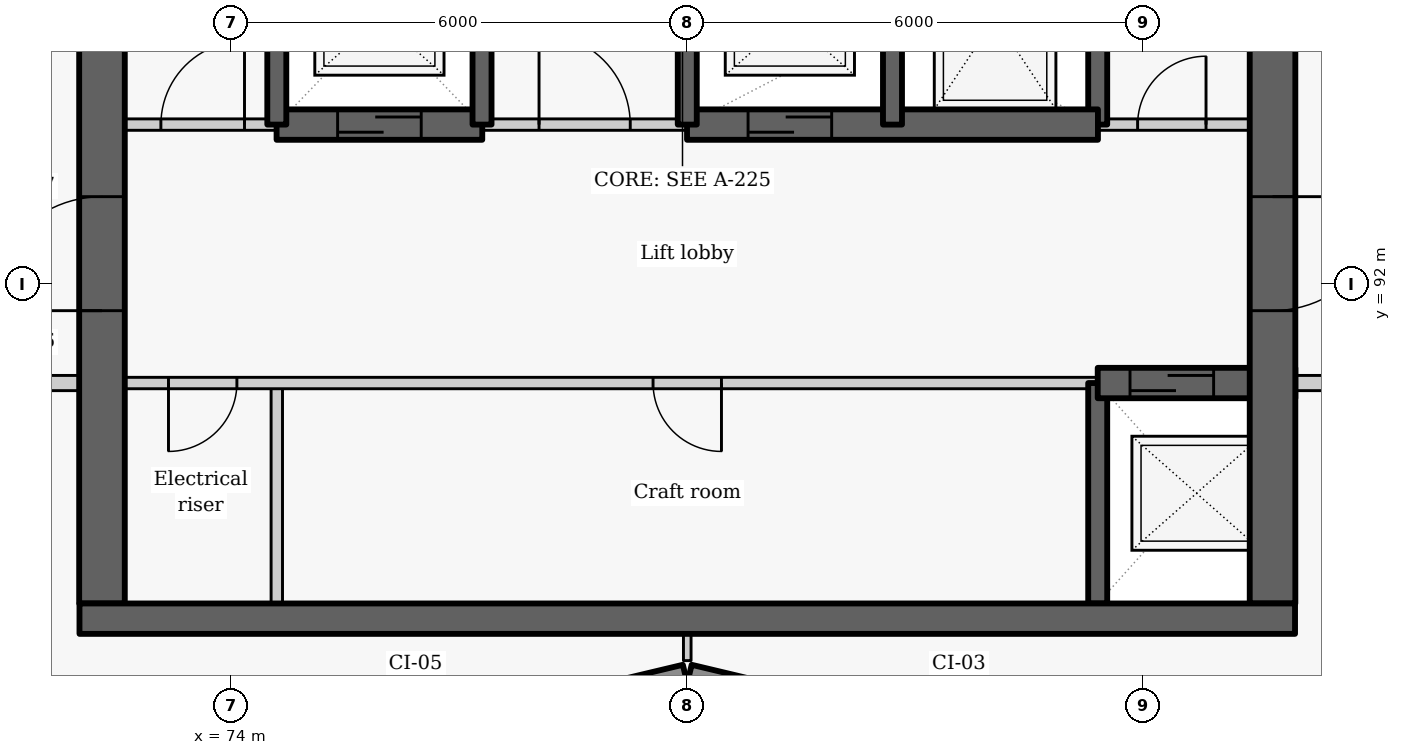
"""IFC4 building model, lengths in metres.
Left out: names, types, materials, properties, quantities, classifications, styles, units other than length and angle.
Written with IfcOpenShell. Run it as: python <this file> out.ifc"""

import sys

from ifc_helpers import new_model, si_unit, direction, frame, frame_2d, origin, place, context, subcontext, project, spatial, rectangle, extrude, element, fill, save


model = new_model("IFC4")
c1 = context("Model", 3, precision=1e-05, world=origin(), true_north=direction((0.0, 1.0)))
c2 = subcontext(c1, "Body", "Model", "MODEL_VIEW")
j1 = project(units=[si_unit("LENGTHUNIT", "METRE"), si_unit("PLANEANGLEUNIT", "RADIAN")], contexts=[c1])
p1 = place(None, origin())
s1 = spatial("IfcSite", under=j1, at=p1, CompositionType="ELEMENT")
p2 = place(p1, origin())
s2 = spatial("IfcBuilding", under=s1, at=p2, CompositionType="ELEMENT")
p3 = place(p2, frame((0.0, 0.0, 130.5)))
s3 = spatial("IfcBuildingStorey", under=s2, at=p3, CompositionType="ELEMENT", Elevation=130.5)
p4 = place(p3, frame((76.814, 86.119, 0.0), z_axis=(0.0, 0.0, 1.0), x_axis=(0.972773113459, 0.231759508395, 0.0)))
e1 = element("IfcWall", 1, at=p4, inside=s3, PredefinedType="SOLIDWALL", context=c2, shape_type="SweptSolid", body=[
    extrude(rectangle(XDim=3.246, YDim=0.25, at=frame_2d((1.623, 0.0))), origin(), (0.0, 0.0, 1.0), 2.425),
])
p5 = place(p4, frame((0.573, 0.0, 0.9)))
e2 = element("IfcOpeningElement", 2, at=p5, cuts=e1, PredefinedType="OPENING", context=c2, shape_type="SweptSolid", body=[
    extrude(rectangle(XDim=2.1, YDim=1.1, at=frame_2d((1.05, 0.55))), frame((0.0, 0.135, 0.0), z_axis=(0.0, -1.0, 0.0), x_axis=(1.0, 0.0, 0.0)), (0.0, 0.0, 1.0), 0.27),
])
p6 = place(p3, frame((80.029, 86.872, 0.0), z_axis=(0.0, 0.0, 1.0), x_axis=(0.972773113459, -0.231759508395, 0.0)))
e3 = element("IfcWall", 3, at=p6, inside=s3, PredefinedType="SOLIDWALL", context=c2, shape_type="SweptSolid", body=[
    extrude(rectangle(XDim=3.246, YDim=0.25, at=frame_2d((1.623, 0.0))), origin(), (0.0, 0.0, 1.0), 2.425),
])
p7 = place(p6, frame((0.573, 0.0, 0.9)))
e4 = element("IfcOpeningElement", 4, at=p7, cuts=e3, PredefinedType="OPENING", context=c2, shape_type="SweptSolid", body=[
    extrude(rectangle(XDim=2.1, YDim=1.1, at=frame_2d((1.05, 0.55))), frame((0.0, 0.135, 0.0), z_axis=(0.0, -1.0, 0.0), x_axis=(1.0, 0.0, 0.0)), (0.0, 0.0, 1.0), 0.27),
])
p8 = place(p3, frame((74.6, 87.8, 0.0), z_axis=(0.0, 0.0, 1.0), x_axis=(0.0, 1.0, 0.0)))
e5 = element("IfcWall", 5, at=p8, inside=s3, PredefinedType="PARTITIONING", context=c2, shape_type="SweptSolid", body=[
    extrude(rectangle(XDim=2.9, YDim=0.15, at=frame_2d((1.45, 0.0))), origin(), (0.0, 0.0, 1.0), 3.025),
])
p9 = place(p3, frame((85.4, 90.7, 0.0), z_axis=(0.0, 0.0, 1.0), x_axis=(-1.0, 0.0, 0.0)))
e6 = element("IfcWall", 6, at=p9, inside=s3, PredefinedType="PARTITIONING", context=c2, shape_type="SweptSolid", body=[
    extrude(rectangle(XDim=13.4, YDim=0.15, at=frame_2d((6.7, 0.0))), origin(), (0.0, 0.0, 1.0), 3.025),
])
p10 = place(p9, frame((11.325, 0.0, 0.0)))
e7 = element("IfcOpeningElement", 7, at=p10, cuts=e6, PredefinedType="OPENING", context=c2, shape_type="SweptSolid", body=[
    extrude(rectangle(XDim=0.9, YDim=2.1, at=frame_2d((0.45, 1.05))), frame((0.0, 0.085, 0.0), z_axis=(0.0, -1.0, 0.0), x_axis=(1.0, 0.0, 0.0)), (0.0, 0.0, 1.0), 0.17),
])
p11 = place(p9, frame((4.95, 0.0, 0.0)))
e8 = element("IfcOpeningElement", 8, at=p11, cuts=e6, PredefinedType="OPENING", context=c2, shape_type="SweptSolid", body=[
    extrude(rectangle(XDim=0.9, YDim=2.1, at=frame_2d((0.45, 1.05))), frame((0.0, 0.085, 0.0), z_axis=(0.0, -1.0, 0.0), x_axis=(1.0, 0.0, 0.0)), (0.0, 0.0, 1.0), 0.17),
])
p12 = place(p3, frame((72.3, 87.8, -0.275), z_axis=(0.0, 0.0, 1.0), x_axis=(0.0, 1.0, 0.0)))
e9 = element("IfcWall", 9, at=p12, inside=s3, PredefinedType="SHEAR", context=c2, shape_type="SweptSolid", body=[
    extrude(rectangle(XDim=9.1, YDim=0.6, at=frame_2d((4.55, 0.0))), origin(), (0.0, 0.0, 1.0), 3.3),
])
p13 = place(p12, frame((3.852, 0.0, 0.275)))
e10 = element("IfcOpeningElement", 10, at=p13, cuts=e9, PredefinedType="OPENING", context=c2, shape_type="SweptSolid", body=[
    extrude(rectangle(XDim=1.5, YDim=2.1, at=frame_2d((0.75, 1.05))), frame((0.0, 0.31, 0.0), z_axis=(0.0, -1.0, 0.0), x_axis=(1.0, 0.0, 0.0)), (0.0, 0.0, 1.0), 0.62),
])
p14 = place(p3, frame((85.4, 87.8, -0.275), z_axis=(0.0, 0.0, 1.0), x_axis=(0.0, 1.0, 0.0)))
e11 = element("IfcWall", 11, at=p14, inside=s3, PredefinedType="SHEAR", context=c2, shape_type="SweptSolid", body=[
    extrude(rectangle(XDim=2.9, YDim=0.25, at=frame_2d((1.45, 0.0))), origin(), (0.0, 0.0, 1.0), 3.3),
])
p15 = place(p3, frame((85.4, 94.1, -0.275), z_axis=(0.0, 0.0, 1.0), x_axis=(0.0, 1.0, 0.0)))
e12 = element("IfcWall", 12, at=p15, inside=s3, PredefinedType="SHEAR", context=c2, shape_type="SweptSolid", body=[
    extrude(rectangle(XDim=2.8, YDim=0.25, at=frame_2d((1.4, 0.0))), origin(), (0.0, 0.0, 1.0), 3.3),
])
p16 = place(p3, frame((85.4, 90.7, -0.275), z_axis=(0.0, 0.0, 1.0), x_axis=(1.0, 0.0, 0.0)))
e13 = element("IfcWall", 13, at=p16, inside=s3, PredefinedType="SHEAR", context=c2, shape_type="SweptSolid", body=[
    extrude(rectangle(XDim=2.6, YDim=0.4, at=frame_2d((1.3, 0.0))), origin(), (0.0, 0.0, 1.0), 3.3),
])
p17 = place(p16, frame((0.425, 0.0, 0.275)))
e14 = element("IfcOpeningElement", 14, at=p17, cuts=e13, PredefinedType="OPENING", context=c2, shape_type="SweptSolid", body=[
    extrude(rectangle(XDim=1.1, YDim=2.1, at=frame_2d((0.55, 1.05))), frame((0.0, 0.21, 0.0), z_axis=(0.0, -1.0, 0.0), x_axis=(1.0, 0.0, 0.0)), (0.0, 0.0, 1.0), 0.42),
])
p18 = place(p3, frame((87.7, 103.4, -0.275), z_axis=(0.0, 0.0, 1.0), x_axis=(0.0, -1.0, 0.0)))
e15 = element("IfcWall", 15, at=p18, inside=s3, PredefinedType="SHEAR", context=c2, shape_type="SweptSolid", body=[
    extrude(rectangle(XDim=15.6, YDim=0.6, at=frame_2d((7.8, 0.0))), origin(), (0.0, 0.0, 1.0), 3.3),
])
p19 = place(p18, frame((10.248, 0.0, 0.275)))
e16 = element("IfcOpeningElement", 16, at=p19, cuts=e15, PredefinedType="OPENING", context=c2, shape_type="SweptSolid", body=[
    extrude(rectangle(XDim=1.5, YDim=2.1, at=frame_2d((0.75, 1.05))), frame((0.0, 0.31, 0.0), z_axis=(0.0, -1.0, 0.0), x_axis=(1.0, 0.0, 0.0)), (0.0, 0.0, 1.0), 0.62),
])
p20 = place(p3, frame((72.0, 94.1, 0.0), z_axis=(0.0, 0.0, 1.0), x_axis=(1.0, 0.0, 0.0)))
e17 = element("IfcWall", 17, at=p20, inside=s3, PredefinedType="PARTITIONING", context=c2, shape_type="SweptSolid", body=[
    extrude(rectangle(XDim=2.603, YDim=0.15, at=frame_2d((1.302, 0.0))), origin(), (0.0, 0.0, 1.0), 3.025),
])
p21 = place(p20, frame((1.075, 0.0, 0.0)))
e18 = element("IfcOpeningElement", 18, at=p21, cuts=e17, PredefinedType="OPENING", context=c2, shape_type="SweptSolid", body=[
    extrude(rectangle(XDim=1.1, YDim=2.1, at=frame_2d((0.55, 1.05))), frame((0.0, 0.085, 0.0), z_axis=(0.0, -1.0, 0.0), x_axis=(1.0, 0.0, 0.0)), (0.0, 0.0, 1.0), 0.17),
])
p22 = place(p3, frame((77.297, 94.1, 0.0), z_axis=(0.0, 0.0, 1.0), x_axis=(1.0, 0.0, 0.0)))
e19 = element("IfcWall", 19, at=p22, inside=s3, PredefinedType="PARTITIONING", context=c2, shape_type="SweptSolid", body=[
    extrude(rectangle(XDim=2.706, YDim=0.15, at=frame_2d((1.353, 0.0))), origin(), (0.0, 0.0, 1.0), 3.025),
])
p23 = place(p22, frame((0.753, 0.0, 0.0)))
e20 = element("IfcOpeningElement", 20, at=p23, cuts=e19, PredefinedType="OPENING", context=c2, shape_type="SweptSolid", body=[
    extrude(rectangle(XDim=1.2, YDim=2.1, at=frame_2d((0.6, 1.05))), frame((0.0, 0.085, 0.0), z_axis=(0.0, -1.0, 0.0), x_axis=(1.0, 0.0, 0.0)), (0.0, 0.0, 1.0), 0.17),
])
p24 = place(p3, frame((85.397, 94.1, 0.0), z_axis=(0.0, 0.0, 1.0), x_axis=(1.0, 0.0, 0.0)))
e21 = element("IfcWall", 21, at=p24, inside=s3, PredefinedType="PARTITIONING", context=c2, shape_type="SweptSolid", body=[
    extrude(rectangle(XDim=2.603, YDim=0.15, at=frame_2d((1.302, 0.0))), origin(), (0.0, 0.0, 1.0), 3.025),
])
p25 = place(p24, frame((0.528, 0.0, 0.0)))
e22 = element("IfcOpeningElement", 22, at=p25, cuts=e21, PredefinedType="OPENING", context=c2, shape_type="SweptSolid", body=[
    extrude(rectangle(XDim=0.9, YDim=2.1, at=frame_2d((0.45, 1.05))), frame((0.0, 0.085, 0.0), z_axis=(0.0, -1.0, 0.0), x_axis=(1.0, 0.0, 0.0)), (0.0, 0.0, 1.0), 0.17),
])
p26 = place(p3, frame((74.597, 94.1, -0.275), z_axis=(0.0, 0.0, 1.0), x_axis=(1.0, 0.0, 0.0)))
e23 = element("IfcWall", 23, at=p26, inside=s3, PredefinedType="SHEAR", context=c2, shape_type="SweptSolid", body=[
    extrude(rectangle(XDim=2.706, YDim=0.4, at=frame_2d((1.353, 0.0))), origin(), (0.0, 0.0, 1.0), 3.3),
])
p27 = place(p26, frame((0.803, 0.0, 0.275)))
e24 = element("IfcOpeningElement", 24, at=p27, cuts=e23, PredefinedType="OPENING", context=c2, shape_type="SweptSolid", body=[
    extrude(rectangle(XDim=1.1, YDim=2.1, at=frame_2d((0.55, 1.05))), frame((0.0, 0.21, 0.0), z_axis=(0.0, -1.0, 0.0), x_axis=(1.0, 0.0, 0.0)), (0.0, 0.0, 1.0), 0.42),
])
p28 = place(p3, frame((79.997, 94.1, -0.275), z_axis=(0.0, 0.0, 1.0), x_axis=(1.0, 0.0, 0.0)))
e25 = element("IfcWall", 25, at=p28, inside=s3, PredefinedType="SHEAR", context=c2, shape_type="SweptSolid", body=[
    extrude(rectangle(XDim=5.406, YDim=0.4, at=frame_2d((2.703, 0.0))), origin(), (0.0, 0.0, 1.0), 3.3),
])
p29 = place(p28, frame((0.803, 0.0, 0.275)))
e26 = element("IfcOpeningElement", 26, at=p29, cuts=e25, PredefinedType="OPENING", context=c2, shape_type="SweptSolid", body=[
    extrude(rectangle(XDim=1.1, YDim=2.1, at=frame_2d((0.55, 1.05))), frame((0.0, 0.21, 0.0), z_axis=(0.0, -1.0, 0.0), x_axis=(1.0, 0.0, 0.0)), (0.0, 0.0, 1.0), 0.42),
])
for number, where, z_axis, x_axis in (
    (27, (74.6, 94.1, -0.275), (0.0, 0.0, 1.0), (0.0, 1.0, 0.0)),
    (28, (77.3, 94.1, -0.275), (0.0, 0.0, 1.0), (0.0, 1.0, 0.0)),
    (29, (80.0, 94.1, -0.275), (0.0, 0.0, 1.0), (0.0, 1.0, 0.0)),
    (30, (82.7, 94.1, -0.275), (0.0, 0.0, 1.0), (0.0, 1.0, 0.0)),
):
    element("IfcWall", number, at=place(p3, frame(where, z_axis=z_axis, x_axis=x_axis)), inside=s3, PredefinedType="SHEAR", context=c2, shape_type="SweptSolid", body=[
        extrude(rectangle(XDim=2.8, YDim=0.25, at=frame_2d((1.4, 0.0))), origin(), (0.0, 0.0, 1.0), 3.3),
    ])
for number, where, z_axis, x_axis in (
    (31, (70.45, 90.7, 0.0), (0.0, 0.0, 1.0), (1.0, 0.0, 0.0)),
    (32, (88.0, 90.7, 0.0), (0.0, 0.0, 1.0), (1.0, 0.0, 0.0)),
):
    element("IfcWall", number, at=place(p3, frame(where, z_axis=z_axis, x_axis=x_axis)), inside=s3, PredefinedType="PARTITIONING", context=c2, shape_type="SweptSolid", body=[
        extrude(rectangle(XDim=1.55, YDim=0.2, at=frame_2d((0.775, 0.0))), origin(), (0.0, 0.0, 1.0), 3.025),
    ])
p30 = place(p3, frame((80.0, 87.048, 0.0), z_axis=(0.0, 0.0, 1.0), x_axis=(0.0, 1.0, 0.0)))
e33 = element("IfcWall", 33, at=p30, inside=s3, PredefinedType="PARTITIONING", context=c2, shape_type="SweptSolid", body=[
    extrude(rectangle(XDim=0.352, YDim=0.1, at=frame_2d((0.176, 0.0))), origin(), (0.0, 0.0, 1.0), 3.025),
])
p31 = place(p3, frame((72.004, 87.6, -0.275), z_axis=(0.0, 0.0, 1.0), x_axis=(1.0, 0.0, 0.0)))
e34 = element("IfcWall", 34, at=p31, inside=s3, PredefinedType="SHEAR", context=c2, shape_type="SweptSolid", body=[
    extrude(rectangle(XDim=15.992, YDim=0.4, at=frame_2d((7.996, 0.0))), origin(), (0.0, 0.0, 1.0), 3.3),
])
p32 = place(p10, origin())
e35 = element("IfcDoor", 35, at=p32, inside=s3, OperationType="SINGLE_SWING_RIGHT", PredefinedType="DOOR", context=c2, shape_type="SweptSolid", body=[
    extrude(rectangle(XDim=0.9, YDim=2.1, at=frame_2d((0.45, 1.05))), frame((0.0, 0.025, 0.0), z_axis=(0.0, -1.0, 0.0), x_axis=(1.0, 0.0, 0.0)), (0.0, 0.0, 1.0), 0.05),
])
fill(e7, e35)
p33 = place(p17, origin())
e36 = element("IfcDoor", 36, at=p33, inside=s3, OperationType="SLIDING_TO_LEFT", PredefinedType="DOOR", context=c2, shape_type="SweptSolid", body=[
    extrude(rectangle(XDim=1.1, YDim=2.1, at=frame_2d((0.55, 1.05))), frame((0.0, 0.025, 0.0), z_axis=(0.0, -1.0, 0.0), x_axis=(1.0, 0.0, 0.0)), (0.0, 0.0, 1.0), 0.05),
])
fill(e14, e36)
p34 = place(p11, origin())
e37 = element("IfcDoor", 37, at=p34, inside=s3, OperationType="SINGLE_SWING_LEFT", PredefinedType="DOOR", context=c2, shape_type="SweptSolid", body=[
    extrude(rectangle(XDim=0.9, YDim=2.1, at=frame_2d((0.45, 1.05))), frame((0.0, 0.025, 0.0), z_axis=(0.0, -1.0, 0.0), x_axis=(1.0, 0.0, 0.0)), (0.0, 0.0, 1.0), 0.05),
])
fill(e8, e37)
p35 = place(p21, origin())
e38 = element("IfcDoor", 38, at=p35, inside=s3, OperationType="SINGLE_SWING_RIGHT", PredefinedType="DOOR", context=c2, shape_type="SweptSolid", body=[
    extrude(rectangle(XDim=1.1, YDim=2.1, at=frame_2d((0.55, 1.05))), frame((0.0, 0.025, 0.0), z_axis=(0.0, -1.0, 0.0), x_axis=(1.0, 0.0, 0.0)), (0.0, 0.0, 1.0), 0.05),
])
fill(e18, e38)
p36 = place(p27, origin())
e39 = element("IfcDoor", 39, at=p36, inside=s3, OperationType="SLIDING_TO_LEFT", PredefinedType="DOOR", context=c2, shape_type="SweptSolid", body=[
    extrude(rectangle(XDim=1.1, YDim=2.1, at=frame_2d((0.55, 1.05))), frame((0.0, 0.025, 0.0), z_axis=(0.0, -1.0, 0.0), x_axis=(1.0, 0.0, 0.0)), (0.0, 0.0, 1.0), 0.05),
])
fill(e24, e39)
p37 = place(p23, origin())
e40 = element("IfcDoor", 40, at=p37, inside=s3, OperationType="DOUBLE_DOOR_SINGLE_SWING", PredefinedType="DOOR", context=c2, shape_type="SweptSolid", body=[
    extrude(rectangle(XDim=1.2, YDim=2.1, at=frame_2d((0.6, 1.05))), frame((0.0, 0.025, 0.0), z_axis=(0.0, -1.0, 0.0), x_axis=(1.0, 0.0, 0.0)), (0.0, 0.0, 1.0), 0.05),
])
fill(e20, e40)
p38 = place(p29, origin())
e41 = element("IfcDoor", 41, at=p38, inside=s3, OperationType="SLIDING_TO_LEFT", PredefinedType="DOOR", context=c2, shape_type="SweptSolid", body=[
    extrude(rectangle(XDim=1.1, YDim=2.1, at=frame_2d((0.55, 1.05))), frame((0.0, 0.025, 0.0), z_axis=(0.0, -1.0, 0.0), x_axis=(1.0, 0.0, 0.0)), (0.0, 0.0, 1.0), 0.05),
])
fill(e26, e41)
p39 = place(p25, origin())
e42 = element("IfcDoor", 42, at=p39, inside=s3, OperationType="SINGLE_SWING_RIGHT", PredefinedType="DOOR", context=c2, shape_type="SweptSolid", body=[
    extrude(rectangle(XDim=0.9, YDim=2.1, at=frame_2d((0.45, 1.05))), frame((0.0, 0.025, 0.0), z_axis=(0.0, -1.0, 0.0), x_axis=(1.0, 0.0, 0.0)), (0.0, 0.0, 1.0), 0.05),
])
fill(e22, e42)
p40 = place(p19, origin())
e43 = element("IfcDoor", 43, at=p40, inside=s3, OperationType="DOUBLE_DOOR_SINGLE_SWING", PredefinedType="DOOR", context=c2, shape_type="SweptSolid", body=[
    extrude(rectangle(XDim=1.5, YDim=2.1, at=frame_2d((0.75, 1.05))), frame((0.0, 0.025, 0.0), z_axis=(0.0, -1.0, 0.0), x_axis=(1.0, 0.0, 0.0)), (0.0, 0.0, 1.0), 0.05),
])
fill(e16, e43)
p41 = place(p13, origin())
e44 = element("IfcDoor", 44, at=p41, inside=s3, OperationType="DOUBLE_DOOR_SINGLE_SWING", PredefinedType="DOOR", context=c2, shape_type="SweptSolid", body=[
    extrude(rectangle(XDim=1.5, YDim=2.1, at=frame_2d((0.75, 1.05))), frame((0.0, 0.025, 0.0), z_axis=(0.0, -1.0, 0.0), x_axis=(1.0, 0.0, 0.0)), (0.0, 0.0, 1.0), 0.05),
])
fill(e10, e44)
save(model, sys.argv[1])
